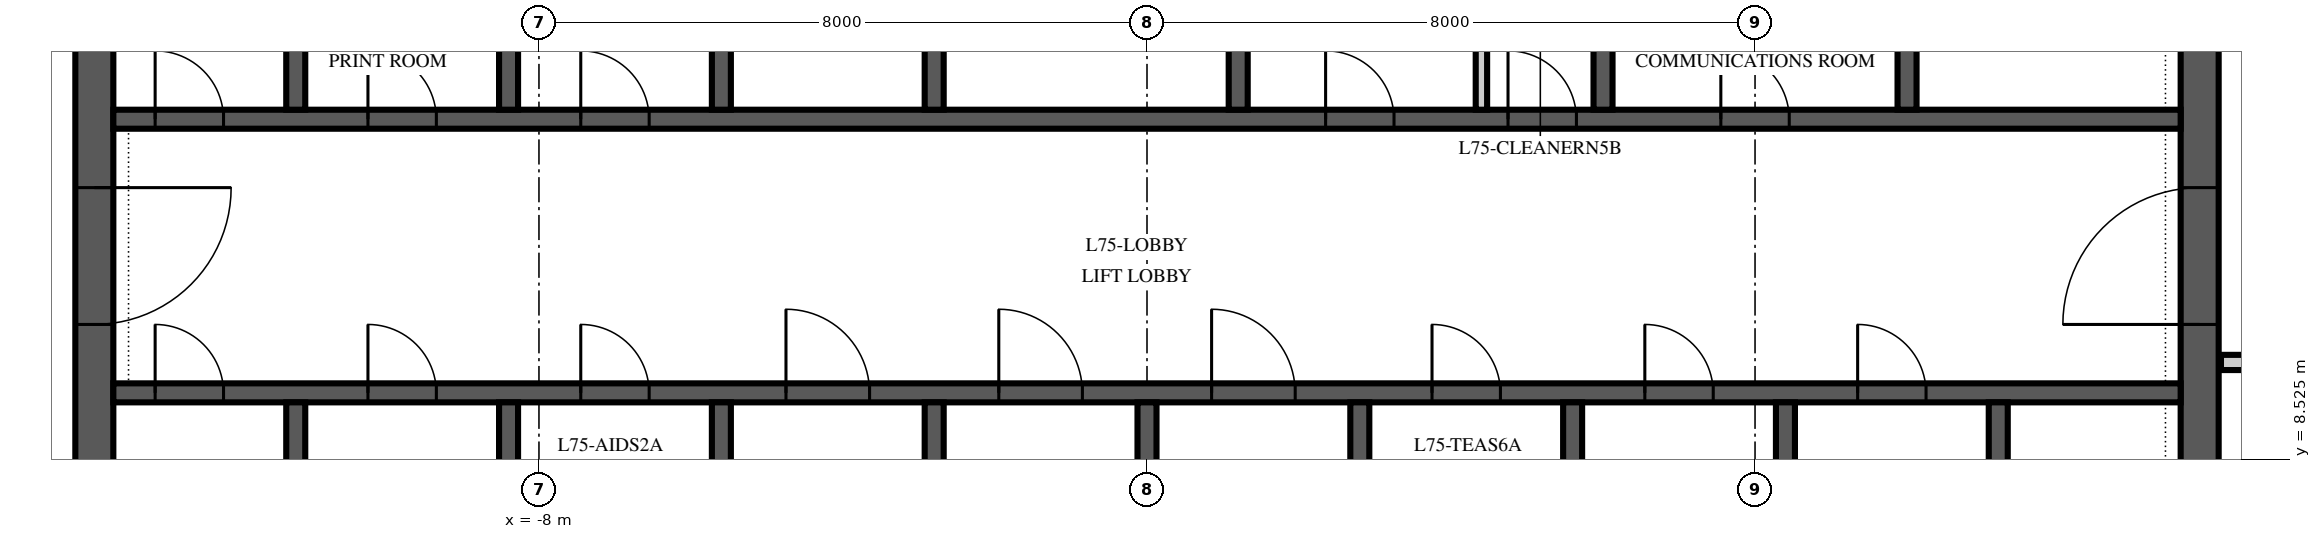
"""IFC4 building model, lengths in metres.
Left out: names, types, materials, properties, quantities, classifications, styles, units other than length and angle.
Written with IfcOpenShell. Run it as: python <this file> out.ifc"""

import sys

from ifc_helpers import new_model, si_unit, direction, frame, frame_2d, origin, place, context, subcontext, project, spatial, polyline, rectangle, outline, extrude, element, fill, save


model = new_model("IFC4")
c1 = context("Model", 3, precision=1e-05, world=origin(), true_north=direction((0.0, 1.0)))
c2 = subcontext(c1, "Body", "Model", "MODEL_VIEW")
j1 = project(units=[si_unit("LENGTHUNIT", "METRE"), si_unit("PLANEANGLEUNIT", "RADIAN")], contexts=[c1])
p1 = place(None, origin())
s1 = spatial("IfcSite", under=j1, at=p1, CompositionType="ELEMENT")
p2 = place(p1, origin())
s2 = spatial("IfcBuilding", under=s1, at=p2, CompositionType="ELEMENT")
p3 = place(p2, frame((0.0, 0.0, 320.0)))
s3 = spatial("IfcBuildingStorey", under=s2, at=p3, CompositionType="ELEMENT", Elevation=320.0)
p4 = place(p3, frame((13.85, 6.15, 0.0), z_axis=(0.0, 0.0, 1.0), x_axis=(0.0, 1.0, 0.0)))
e1 = element("IfcWall", 1, at=p4, inside=s3, PredefinedType="SHEAR", context=c2, shape_type="SweptSolid", body=[
    extrude(outline(polyline([(0.0, -0.25), (17.7, -0.25), (17.7, 0.0), (17.45, 0.0), (17.45, 0.25), (0.25, 0.25), (0.25, 0.0), (0.0, 0.0), (0.0, -0.25)])), origin(), (0.0, 0.0, 1.0), 4.0),
])
p5 = place(p4, frame((4.15, 0.0, 0.0)))
e2 = element("IfcOpeningElement", 2, at=p5, cuts=e1, PredefinedType="OPENING", context=c2, shape_type="SweptSolid", body=[
    extrude(rectangle(XDim=1.8, YDim=2.4, at=frame_2d((0.9, 1.2))), frame((0.0, 0.265, 0.0), z_axis=(0.0, -1.0, 0.0), x_axis=(1.0, 0.0, 0.0)), (0.0, 0.0, 1.0), 0.53),
])
p6 = place(p3, frame((-13.85, 23.85, 0.0), z_axis=(0.0, 0.0, 1.0), x_axis=(0.0, -1.0, 0.0)))
e3 = element("IfcWall", 3, at=p6, inside=s3, PredefinedType="SHEAR", context=c2, shape_type="SweptSolid", body=[
    extrude(outline(polyline([(0.0, -0.25), (17.7, -0.25), (17.7, 0.0), (17.45, 0.0), (17.45, 0.25), (0.25, 0.25), (0.25, 0.0), (0.0, 0.0), (0.0, -0.25)])), origin(), (0.0, 0.0, 1.0), 4.0),
])
p7 = place(p6, frame((11.75, 0.0, 0.0)))
e4 = element("IfcOpeningElement", 4, at=p7, cuts=e3, PredefinedType="OPENING", context=c2, shape_type="SweptSolid", body=[
    extrude(rectangle(XDim=1.8, YDim=2.4, at=frame_2d((0.9, 1.2))), frame((0.0, 0.265, 0.0), z_axis=(0.0, -1.0, 0.0), x_axis=(1.0, 0.0, 0.0)), (0.0, 0.0, 1.0), 0.53),
])
p8 = place(p3, frame((-13.6, 9.4, 0.0), z_axis=(0.0, 0.0, 1.0), x_axis=(1.0, 0.0, 0.0)))
e5 = element("IfcWall", 5, at=p8, inside=s3, PredefinedType="SHEAR", context=c2, shape_type="SweptSolid", body=[
    extrude(rectangle(XDim=27.2, YDim=0.25, at=frame_2d((13.6, 0.0))), origin(), (0.0, 0.0, 1.0), 4.0),
])
p9 = place(p8, frame((8.85, 0.0, 0.0)))
e6 = element("IfcOpeningElement", 6, at=p9, cuts=e5, PredefinedType="OPENING", context=c2, shape_type="SweptSolid", body=[
    extrude(rectangle(XDim=1.1, YDim=2.1, at=frame_2d((0.55, 1.05))), frame((0.0, 0.14, 0.0), z_axis=(0.0, -1.0, 0.0), x_axis=(1.0, 0.0, 0.0)), (0.0, 0.0, 1.0), 0.28),
])
p10 = place(p8, frame((11.65, 0.0, 0.0)))
e7 = element("IfcOpeningElement", 7, at=p10, cuts=e5, PredefinedType="OPENING", context=c2, shape_type="SweptSolid", body=[
    extrude(rectangle(XDim=1.1, YDim=2.1, at=frame_2d((0.55, 1.05))), frame((0.0, 0.14, 0.0), z_axis=(0.0, -1.0, 0.0), x_axis=(1.0, 0.0, 0.0)), (0.0, 0.0, 1.0), 0.28),
])
p11 = place(p8, frame((14.45, 0.0, 0.0)))
e8 = element("IfcOpeningElement", 8, at=p11, cuts=e5, PredefinedType="OPENING", context=c2, shape_type="SweptSolid", body=[
    extrude(rectangle(XDim=1.1, YDim=2.1, at=frame_2d((0.55, 1.05))), frame((0.0, 0.14, 0.0), z_axis=(0.0, -1.0, 0.0), x_axis=(1.0, 0.0, 0.0)), (0.0, 0.0, 1.0), 0.28),
])
p12 = place(p8, frame((0.55, 0.0, 0.0)))
e9 = element("IfcOpeningElement", 9, at=p12, cuts=e5, PredefinedType="OPENING", context=c2, shape_type="SweptSolid", body=[
    extrude(rectangle(XDim=0.9, YDim=2.1, at=frame_2d((0.45, 1.05))), frame((0.0, 0.14, 0.0), z_axis=(0.0, -1.0, 0.0), x_axis=(1.0, 0.0, 0.0)), (0.0, 0.0, 1.0), 0.28),
])
p13 = place(p8, frame((3.35, 0.0, 0.0)))
e10 = element("IfcOpeningElement", 10, at=p13, cuts=e5, PredefinedType="OPENING", context=c2, shape_type="SweptSolid", body=[
    extrude(rectangle(XDim=0.9, YDim=2.1, at=frame_2d((0.45, 1.05))), frame((0.0, 0.14, 0.0), z_axis=(0.0, -1.0, 0.0), x_axis=(1.0, 0.0, 0.0)), (0.0, 0.0, 1.0), 0.28),
])
p14 = place(p8, frame((6.15, 0.0, 0.0)))
e11 = element("IfcOpeningElement", 11, at=p14, cuts=e5, PredefinedType="OPENING", context=c2, shape_type="SweptSolid", body=[
    extrude(rectangle(XDim=0.9, YDim=2.1, at=frame_2d((0.45, 1.05))), frame((0.0, 0.14, 0.0), z_axis=(0.0, -1.0, 0.0), x_axis=(1.0, 0.0, 0.0)), (0.0, 0.0, 1.0), 0.28),
])
p15 = place(p8, frame((17.35, 0.0, 0.0)))
e12 = element("IfcOpeningElement", 12, at=p15, cuts=e5, PredefinedType="OPENING", context=c2, shape_type="SweptSolid", body=[
    extrude(rectangle(XDim=0.9, YDim=2.1, at=frame_2d((0.45, 1.05))), frame((0.0, 0.14, 0.0), z_axis=(0.0, -1.0, 0.0), x_axis=(1.0, 0.0, 0.0)), (0.0, 0.0, 1.0), 0.28),
])
p16 = place(p8, frame((20.15, 0.0, 0.0)))
e13 = element("IfcOpeningElement", 13, at=p16, cuts=e5, PredefinedType="OPENING", context=c2, shape_type="SweptSolid", body=[
    extrude(rectangle(XDim=0.9, YDim=2.1, at=frame_2d((0.45, 1.05))), frame((0.0, 0.14, 0.0), z_axis=(0.0, -1.0, 0.0), x_axis=(1.0, 0.0, 0.0)), (0.0, 0.0, 1.0), 0.28),
])
p17 = place(p8, frame((22.95, 0.0, 0.0)))
e14 = element("IfcOpeningElement", 14, at=p17, cuts=e5, PredefinedType="OPENING", context=c2, shape_type="SweptSolid", body=[
    extrude(rectangle(XDim=0.9, YDim=2.1, at=frame_2d((0.45, 1.05))), frame((0.0, 0.14, 0.0), z_axis=(0.0, -1.0, 0.0), x_axis=(1.0, 0.0, 0.0)), (0.0, 0.0, 1.0), 0.28),
])
p18 = place(p3, frame((-13.6, 13.0, 0.0), z_axis=(0.0, 0.0, 1.0), x_axis=(1.0, 0.0, 0.0)))
e15 = element("IfcWall", 15, at=p18, inside=s3, PredefinedType="SHEAR", context=c2, shape_type="SweptSolid", body=[
    extrude(rectangle(XDim=27.2, YDim=0.25, at=frame_2d((13.6, 0.0))), origin(), (0.0, 0.0, 1.0), 4.0),
])
p19 = place(p18, frame((15.95, 0.0, 0.0)))
e16 = element("IfcOpeningElement", 16, at=p19, cuts=e15, PredefinedType="OPENING", context=c2, shape_type="SweptSolid", body=[
    extrude(rectangle(XDim=0.9, YDim=2.1, at=frame_2d((0.45, 1.05))), frame((0.0, 0.14, 0.0), z_axis=(0.0, -1.0, 0.0), x_axis=(1.0, 0.0, 0.0)), (0.0, 0.0, 1.0), 0.28),
])
p20 = place(p18, frame((18.35, 0.0, 0.0)))
e17 = element("IfcOpeningElement", 17, at=p20, cuts=e15, PredefinedType="OPENING", context=c2, shape_type="SweptSolid", body=[
    extrude(rectangle(XDim=0.9, YDim=2.1, at=frame_2d((0.45, 1.05))), frame((0.0, 0.14, 0.0), z_axis=(0.0, -1.0, 0.0), x_axis=(1.0, 0.0, 0.0)), (0.0, 0.0, 1.0), 0.28),
])
p21 = place(p18, frame((21.15, 0.0, 0.0)))
e18 = element("IfcOpeningElement", 18, at=p21, cuts=e15, PredefinedType="OPENING", context=c2, shape_type="SweptSolid", body=[
    extrude(rectangle(XDim=0.9, YDim=2.1, at=frame_2d((0.45, 1.05))), frame((0.0, 0.14, 0.0), z_axis=(0.0, -1.0, 0.0), x_axis=(1.0, 0.0, 0.0)), (0.0, 0.0, 1.0), 0.28),
])
p22 = place(p18, frame((0.55, 0.0, 0.0)))
e19 = element("IfcOpeningElement", 19, at=p22, cuts=e15, PredefinedType="OPENING", context=c2, shape_type="SweptSolid", body=[
    extrude(rectangle(XDim=0.9, YDim=2.1, at=frame_2d((0.45, 1.05))), frame((0.0, 0.14, 0.0), z_axis=(0.0, -1.0, 0.0), x_axis=(1.0, 0.0, 0.0)), (0.0, 0.0, 1.0), 0.28),
])
p23 = place(p18, frame((3.35, 0.0, 0.0)))
e20 = element("IfcOpeningElement", 20, at=p23, cuts=e15, PredefinedType="OPENING", context=c2, shape_type="SweptSolid", body=[
    extrude(rectangle(XDim=0.9, YDim=2.1, at=frame_2d((0.45, 1.05))), frame((0.0, 0.14, 0.0), z_axis=(0.0, -1.0, 0.0), x_axis=(1.0, 0.0, 0.0)), (0.0, 0.0, 1.0), 0.28),
])
p24 = place(p18, frame((6.15, 0.0, 0.0)))
e21 = element("IfcOpeningElement", 21, at=p24, cuts=e15, PredefinedType="OPENING", context=c2, shape_type="SweptSolid", body=[
    extrude(rectangle(XDim=0.9, YDim=2.1, at=frame_2d((0.45, 1.05))), frame((0.0, 0.14, 0.0), z_axis=(0.0, -1.0, 0.0), x_axis=(1.0, 0.0, 0.0)), (0.0, 0.0, 1.0), 0.28),
])
for number, where, z_axis, x_axis in (
    (22, (-11.2, 6.4, 0.0), (0.0, 0.0, 1.0), (0.0, 1.0, 0.0)),
    (23, (-8.4, 6.4, 0.0), (0.0, 0.0, 1.0), (0.0, 1.0, 0.0)),
    (24, (-5.6, 6.4, 0.0), (0.0, 0.0, 1.0), (0.0, 1.0, 0.0)),
    (25, (-2.8, 6.4, 0.0), (0.0, 0.0, 1.0), (0.0, 1.0, 0.0)),
    (26, (0.0, 6.4, 0.0), (0.0, 0.0, 1.0), (0.0, 1.0, 0.0)),
    (27, (2.8, 6.4, 0.0), (0.0, 0.0, 1.0), (0.0, 1.0, 0.0)),
    (28, (5.6, 6.4, 0.0), (0.0, 0.0, 1.0), (0.0, 1.0, 0.0)),
    (29, (8.4, 6.4, 0.0), (0.0, 0.0, 1.0), (0.0, 1.0, 0.0)),
    (30, (11.2, 6.4, 0.0), (0.0, 0.0, 1.0), (0.0, 1.0, 0.0)),
):
    element("IfcWall", number, at=place(p3, frame(where, z_axis=z_axis, x_axis=x_axis)), inside=s3, PredefinedType="SHEAR", context=c2, shape_type="SweptSolid", body=[
        extrude(rectangle(XDim=2.875, YDim=0.25, at=frame_2d((1.438, 0.0))), origin(), (0.0, 0.0, 1.0), 4.0),
    ])
for number, where, z_axis, x_axis in (
    (31, (-11.2, 13.125, 0.0), (0.0, 0.0, 1.0), (0.0, 1.0, 0.0)),
    (32, (-8.4, 13.125, 0.0), (0.0, 0.0, 1.0), (0.0, 1.0, 0.0)),
    (33, (-5.6, 13.125, 0.0), (0.0, 0.0, 1.0), (0.0, 1.0, 0.0)),
    (34, (-2.8, 13.125, 0.0), (0.0, 0.0, 1.0), (0.0, 1.0, 0.0)),
    (35, (1.2, 13.125, 0.0), (0.0, 0.0, 1.0), (0.0, 1.0, 0.0)),
    (36, (6.0, 13.125, 0.0), (0.0, 0.0, 1.0), (0.0, 1.0, 0.0)),
    (37, (10.0, 13.125, 0.0), (0.0, 0.0, 1.0), (0.0, 1.0, 0.0)),
):
    element("IfcWall", number, at=place(p3, frame(where, z_axis=z_axis, x_axis=x_axis)), inside=s3, PredefinedType="SHEAR", context=c2, shape_type="SweptSolid", body=[
        extrude(rectangle(XDim=2.75, YDim=0.25, at=frame_2d((1.375, 0.0))), origin(), (0.0, 0.0, 1.0), 4.0),
    ])
p25 = place(p3, frame((4.4, 13.125, 0.0), z_axis=(0.0, 0.0, 1.0), x_axis=(0.0, 1.0, 0.0)))
e38 = element("IfcWall", 38, at=p25, inside=s3, PredefinedType="PARTITIONING", context=c2, shape_type="SweptSolid", body=[
    extrude(rectangle(XDim=2.75, YDim=0.15, at=frame_2d((1.375, 0.0))), origin(), (0.0, 0.0, 1.0), 3.85),
])
p26 = place(p3, frame((14.13, 9.8, 0.0), z_axis=(0.0, 0.0, 1.0), x_axis=(1.0, 0.0, 0.0)))
e39 = element("IfcWall", 39, at=p26, inside=s3, PredefinedType="PARTITIONING", context=c2, shape_type="SweptSolid", body=[
    extrude(rectangle(XDim=2.02, YDim=0.2, at=frame_2d((1.01, 0.0))), origin(), (0.0, 0.0, 1.0), 3.75),
])
p27 = place(p5, origin())
e40 = element("IfcDoor", 40, at=p27, inside=s3, OperationType="DOUBLE_DOOR_SINGLE_SWING", PredefinedType="DOOR", context=c2, shape_type="SweptSolid", body=[
    extrude(rectangle(XDim=1.8, YDim=2.4, at=frame_2d((0.9, 1.2))), frame((0.0, 0.25, 0.0), z_axis=(0.0, -1.0, 0.0), x_axis=(1.0, 0.0, 0.0)), (0.0, 0.0, 1.0), 0.5),
])
fill(e2, e40)
p28 = place(p7, origin())
e41 = element("IfcDoor", 41, at=p28, inside=s3, OperationType="DOUBLE_DOOR_SINGLE_SWING", PredefinedType="DOOR", context=c2, shape_type="SweptSolid", body=[
    extrude(rectangle(XDim=1.8, YDim=2.4, at=frame_2d((0.9, 1.2))), frame((0.0, 0.25, 0.0), z_axis=(0.0, -1.0, 0.0), x_axis=(1.0, 0.0, 0.0)), (0.0, 0.0, 1.0), 0.5),
])
fill(e4, e41)
p29 = place(p9, origin())
e42 = element("IfcDoor", 42, at=p29, inside=s3, OperationType="SLIDING_TO_LEFT", PredefinedType="DOOR", context=c2, shape_type="SweptSolid", body=[
    extrude(rectangle(XDim=1.1, YDim=2.1, at=frame_2d((0.55, 1.05))), frame((0.0, 0.125, 0.0), z_axis=(0.0, -1.0, 0.0), x_axis=(1.0, 0.0, 0.0)), (0.0, 0.0, 1.0), 0.25),
])
fill(e6, e42)
p30 = place(p10, origin())
e43 = element("IfcDoor", 43, at=p30, inside=s3, OperationType="SLIDING_TO_LEFT", PredefinedType="DOOR", context=c2, shape_type="SweptSolid", body=[
    extrude(rectangle(XDim=1.1, YDim=2.1, at=frame_2d((0.55, 1.05))), frame((0.0, 0.125, 0.0), z_axis=(0.0, -1.0, 0.0), x_axis=(1.0, 0.0, 0.0)), (0.0, 0.0, 1.0), 0.25),
])
fill(e7, e43)
p31 = place(p11, origin())
e44 = element("IfcDoor", 44, at=p31, inside=s3, OperationType="SLIDING_TO_LEFT", PredefinedType="DOOR", context=c2, shape_type="SweptSolid", body=[
    extrude(rectangle(XDim=1.1, YDim=2.1, at=frame_2d((0.55, 1.05))), frame((0.0, 0.125, 0.0), z_axis=(0.0, -1.0, 0.0), x_axis=(1.0, 0.0, 0.0)), (0.0, 0.0, 1.0), 0.25),
])
fill(e8, e44)
p32 = place(p19, origin())
e45 = element("IfcDoor", 45, at=p32, inside=s3, OperationType="SINGLE_SWING_LEFT", PredefinedType="DOOR", context=c2, shape_type="SweptSolid", body=[
    extrude(rectangle(XDim=0.9, YDim=2.1, at=frame_2d((0.45, 1.05))), frame((0.0, 0.125, 0.0), z_axis=(0.0, -1.0, 0.0), x_axis=(1.0, 0.0, 0.0)), (0.0, 0.0, 1.0), 0.25),
])
fill(e16, e45)
p33 = place(p20, origin())
e46 = element("IfcDoor", 46, at=p33, inside=s3, OperationType="SINGLE_SWING_LEFT", PredefinedType="DOOR", context=c2, shape_type="SweptSolid", body=[
    extrude(rectangle(XDim=0.9, YDim=2.1, at=frame_2d((0.45, 1.05))), frame((0.0, 0.125, 0.0), z_axis=(0.0, -1.0, 0.0), x_axis=(1.0, 0.0, 0.0)), (0.0, 0.0, 1.0), 0.25),
])
fill(e17, e46)
p34 = place(p21, origin())
e47 = element("IfcDoor", 47, at=p34, inside=s3, OperationType="SINGLE_SWING_LEFT", PredefinedType="DOOR", context=c2, shape_type="SweptSolid", body=[
    extrude(rectangle(XDim=0.9, YDim=2.1, at=frame_2d((0.45, 1.05))), frame((0.0, 0.125, 0.0), z_axis=(0.0, -1.0, 0.0), x_axis=(1.0, 0.0, 0.0)), (0.0, 0.0, 1.0), 0.25),
])
fill(e18, e47)
p35 = place(p22, origin())
e48 = element("IfcDoor", 48, at=p35, inside=s3, OperationType="SINGLE_SWING_LEFT", PredefinedType="DOOR", context=c2, shape_type="SweptSolid", body=[
    extrude(rectangle(XDim=0.9, YDim=2.1, at=frame_2d((0.45, 1.05))), frame((0.0, 0.125, 0.0), z_axis=(0.0, -1.0, 0.0), x_axis=(1.0, 0.0, 0.0)), (0.0, 0.0, 1.0), 0.25),
])
fill(e19, e48)
p36 = place(p23, origin())
e49 = element("IfcDoor", 49, at=p36, inside=s3, OperationType="SINGLE_SWING_LEFT", PredefinedType="DOOR", context=c2, shape_type="SweptSolid", body=[
    extrude(rectangle(XDim=0.9, YDim=2.1, at=frame_2d((0.45, 1.05))), frame((0.0, 0.125, 0.0), z_axis=(0.0, -1.0, 0.0), x_axis=(1.0, 0.0, 0.0)), (0.0, 0.0, 1.0), 0.25),
])
fill(e20, e49)
p37 = place(p24, origin())
e50 = element("IfcDoor", 50, at=p37, inside=s3, OperationType="SINGLE_SWING_LEFT", PredefinedType="DOOR", context=c2, shape_type="SweptSolid", body=[
    extrude(rectangle(XDim=0.9, YDim=2.1, at=frame_2d((0.45, 1.05))), frame((0.0, 0.125, 0.0), z_axis=(0.0, -1.0, 0.0), x_axis=(1.0, 0.0, 0.0)), (0.0, 0.0, 1.0), 0.25),
])
fill(e21, e50)
p38 = place(p12, origin())
e51 = element("IfcDoor", 51, at=p38, inside=s3, OperationType="SINGLE_SWING_LEFT", PredefinedType="DOOR", context=c2, shape_type="SweptSolid", body=[
    extrude(rectangle(XDim=0.9, YDim=2.1, at=frame_2d((0.45, 1.05))), frame((0.0, 0.125, 0.0), z_axis=(0.0, -1.0, 0.0), x_axis=(1.0, 0.0, 0.0)), (0.0, 0.0, 1.0), 0.25),
])
fill(e9, e51)
p39 = place(p13, origin())
e52 = element("IfcDoor", 52, at=p39, inside=s3, OperationType="SINGLE_SWING_LEFT", PredefinedType="DOOR", context=c2, shape_type="SweptSolid", body=[
    extrude(rectangle(XDim=0.9, YDim=2.1, at=frame_2d((0.45, 1.05))), frame((0.0, 0.125, 0.0), z_axis=(0.0, -1.0, 0.0), x_axis=(1.0, 0.0, 0.0)), (0.0, 0.0, 1.0), 0.25),
])
fill(e10, e52)
p40 = place(p14, origin())
e53 = element("IfcDoor", 53, at=p40, inside=s3, OperationType="SINGLE_SWING_LEFT", PredefinedType="DOOR", context=c2, shape_type="SweptSolid", body=[
    extrude(rectangle(XDim=0.9, YDim=2.1, at=frame_2d((0.45, 1.05))), frame((0.0, 0.125, 0.0), z_axis=(0.0, -1.0, 0.0), x_axis=(1.0, 0.0, 0.0)), (0.0, 0.0, 1.0), 0.25),
])
fill(e11, e53)
p41 = place(p15, origin())
e54 = element("IfcDoor", 54, at=p41, inside=s3, OperationType="SINGLE_SWING_LEFT", PredefinedType="DOOR", context=c2, shape_type="SweptSolid", body=[
    extrude(rectangle(XDim=0.9, YDim=2.1, at=frame_2d((0.45, 1.05))), frame((0.0, 0.125, 0.0), z_axis=(0.0, -1.0, 0.0), x_axis=(1.0, 0.0, 0.0)), (0.0, 0.0, 1.0), 0.25),
])
fill(e12, e54)
p42 = place(p16, origin())
e55 = element("IfcDoor", 55, at=p42, inside=s3, OperationType="SINGLE_SWING_LEFT", PredefinedType="DOOR", context=c2, shape_type="SweptSolid", body=[
    extrude(rectangle(XDim=0.9, YDim=2.1, at=frame_2d((0.45, 1.05))), frame((0.0, 0.125, 0.0), z_axis=(0.0, -1.0, 0.0), x_axis=(1.0, 0.0, 0.0)), (0.0, 0.0, 1.0), 0.25),
])
fill(e13, e55)
p43 = place(p17, origin())
e56 = element("IfcDoor", 56, at=p43, inside=s3, OperationType="SINGLE_SWING_LEFT", PredefinedType="DOOR", context=c2, shape_type="SweptSolid", body=[
    extrude(rectangle(XDim=0.9, YDim=2.1, at=frame_2d((0.45, 1.05))), frame((0.0, 0.125, 0.0), z_axis=(0.0, -1.0, 0.0), x_axis=(1.0, 0.0, 0.0)), (0.0, 0.0, 1.0), 0.25),
])
fill(e14, e56)
save(model, sys.argv[1])
